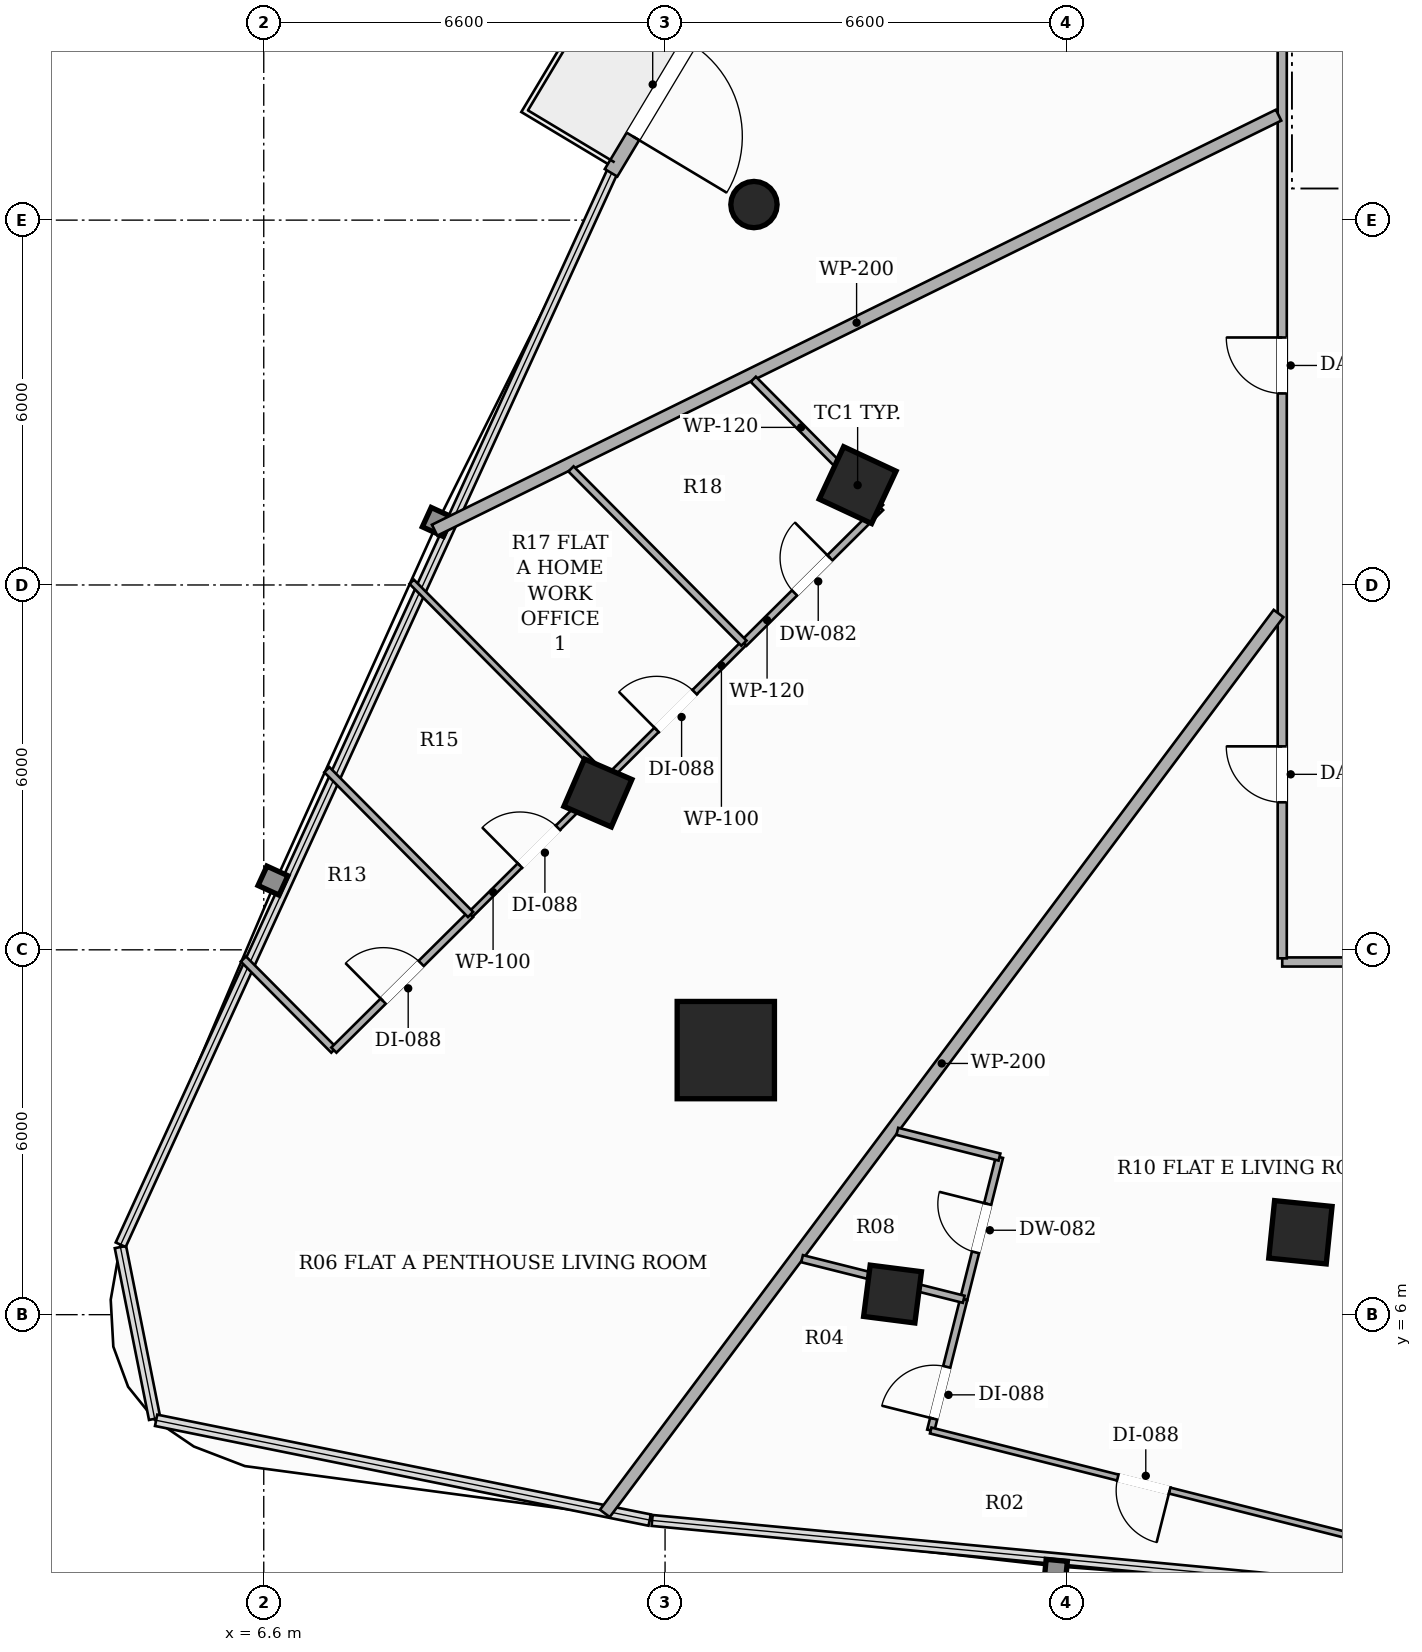
"""IFC4 building model, lengths in metres.
Left out: names, types, materials, properties, quantities, classifications, styles, units other than length and angle.
Written with IfcOpenShell. Run it as: python <this file> out.ifc"""

import sys

from ifc_helpers import new_model, si_unit, direction, frame, frame_2d, origin, origin_2d, place, context, subcontext, project, spatial, rectangle, hollow_rectangle, hollow_circle, extrude, element, fill, save


model = new_model("IFC4")
c1 = context("Model", 3, precision=1e-05, world=origin(), true_north=direction((0.0, 1.0)))
c2 = subcontext(c1, "Body", "Model", "MODEL_VIEW")
j1 = project(units=[si_unit("LENGTHUNIT", "METRE"), si_unit("PLANEANGLEUNIT", "RADIAN")], contexts=[c1])
p1 = place(None, origin())
s1 = spatial("IfcSite", under=j1, at=p1, CompositionType="ELEMENT")
p2 = place(p1, origin())
s2 = spatial("IfcBuilding", under=s1, at=p2, CompositionType="ELEMENT")
p3 = place(p2, frame((0.0, 0.0, 40.1)))
s3 = spatial("IfcBuildingStorey", under=s2, at=p3, CompositionType="ELEMENT", Elevation=40.1)
p4 = place(p3, frame((14.199, 10.351, 0.0), z_axis=(0.0, 0.0, 1.0), x_axis=(1.0, 0.0, 0.0)))
e1 = element("IfcColumn", 1, at=p4, inside=s3, PredefinedType="COLUMN", context=c2, shape_type="SweptSolid", body=[
    extrude(hollow_rectangle(XDim=1.6, YDim=1.6, WallThickness=0.05, at=origin_2d()), origin(), (0.0, 0.0, 1.0), 3.3),
])
for number, where, z_axis, x_axis in (
    (2, (16.367, 19.642, 0.0), (0.0, 0.0, 1.0), (0.423, 0.906, 0.0)),
    (3, (23.649, 7.355, 0.0), (0.0, 0.0, 1.0), (-0.995, 0.101, 0.0)),
):
    element("IfcColumn", number, at=place(p3, frame(where, z_axis=z_axis, x_axis=x_axis)), inside=s3, PredefinedType="COLUMN", context=c2, shape_type="SweptSolid", body=[
        extrude(hollow_rectangle(XDim=0.95, YDim=0.95, WallThickness=0.032, at=origin_2d()), origin(), (0.0, 0.0, 1.0), 3.3),
    ])
for number, where, z_axis, x_axis in (
    (4, (12.095, 14.58, 0.0), (0.0, 0.0, 1.0), (0.397, 0.918, 0.0)),
    (5, (16.941, 6.339, 0.0), (0.0, 0.0, 1.0), (-0.992, 0.127, 0.0)),
):
    element("IfcColumn", number, at=place(p3, frame(where, z_axis=z_axis, x_axis=x_axis)), inside=s3, PredefinedType="COLUMN", context=c2, shape_type="SweptSolid", body=[
        extrude(hollow_rectangle(XDim=0.85, YDim=0.85, WallThickness=0.028, at=origin_2d()), origin(), (0.0, 0.0, 1.0), 3.3),
    ])
p5 = place(p3, frame((14.662, 24.256, 0.0), z_axis=(0.0, 0.0, 1.0), x_axis=(1.0, 0.0, 0.0)))
e6 = element("IfcColumn", 6, at=p5, inside=s3, PredefinedType="COLUMN", context=c2, shape_type="SweptSolid", body=[
    extrude(hollow_circle(Radius=0.381, WallThickness=0.022, at=origin_2d()), origin(), (0.0, 0.0, 1.0), 3.3),
])
p6 = place(p3, frame((19.059, 36.028, 0.0), z_axis=(0.0, 0.0, 1.0), x_axis=(-0.514331531946, -0.857591438417, 0.0)))
e7 = element("IfcWall", 7, at=p6, inside=s3, PredefinedType="SOLIDWALL", context=c2, shape_type="SweptSolid", body=[
    extrude(rectangle(XDim=13.118, YDim=0.24, at=frame_2d((6.559, 0.0))), origin(), (0.0, 0.0, 1.0), 2.624),
])
p7 = place(p6, frame((10.62, 0.0, 0.0)))
e8 = element("IfcOpeningElement", 8, at=p7, cuts=e7, PredefinedType="OPENING", context=c2, shape_type="SweptSolid", body=[
    extrude(rectangle(XDim=1.8, YDim=2.2, at=frame_2d((0.9, 1.1))), frame((0.0, 0.13, 0.0), z_axis=(0.0, -1.0, 0.0), x_axis=(1.0, 0.0, 0.0)), (0.0, 0.0, 1.0), 0.26),
])
p8 = place(p3, frame((42.59, 11.8, 0.0), z_axis=(0.0, 0.0, 1.0), x_axis=(-1.0, 0.0, 0.0)))
e9 = element("IfcWall", 9, at=p8, inside=s3, PredefinedType="PARTITIONING", context=c2, shape_type="SweptSolid", body=[
    extrude(rectangle(XDim=19.24, YDim=0.15, at=frame_2d((9.62, 0.0))), origin(), (0.0, 0.0, 1.0), 2.669),
])
p9 = place(p8, frame((10.462, 0.0, 0.0)))
e10 = element("IfcOpeningElement", 10, at=p9, cuts=e9, PredefinedType="OPENING", context=c2, shape_type="SweptSolid", body=[
    extrude(rectangle(XDim=0.92, YDim=2.15, at=frame_2d((0.46, 1.075))), frame((0.0, 0.085, 0.0), z_axis=(0.0, -1.0, 0.0), x_axis=(1.0, 0.0, 0.0)), (0.0, 0.0, 1.0), 0.17),
])
p10 = place(p3, frame((23.35, 11.86, 0.0), z_axis=(0.0, 0.0, 1.0), x_axis=(0.0, 1.0, 0.0)))
e11 = element("IfcWall", 11, at=p10, inside=s3, PredefinedType="PARTITIONING", context=c2, shape_type="SweptSolid", body=[
    extrude(rectangle(XDim=25.04, YDim=0.15, at=frame_2d((12.52, 0.0))), origin(), (0.0, 0.0, 1.0), 2.413),
])
p11 = place(p10, frame((9.29, 0.0, 0.0)))
e12 = element("IfcOpeningElement", 12, at=p11, cuts=e11, PredefinedType="OPENING", context=c2, shape_type="SweptSolid", body=[
    extrude(rectangle(XDim=0.92, YDim=2.15, at=frame_2d((0.46, 1.075))), frame((0.0, 0.085, 0.0), z_axis=(0.0, -1.0, 0.0), x_axis=(1.0, 0.0, 0.0)), (0.0, 0.0, 1.0), 0.17),
])
p12 = place(p10, frame((18.865, 0.0, 0.0)))
e13 = element("IfcOpeningElement", 13, at=p12, cuts=e11, PredefinedType="OPENING", context=c2, shape_type="SweptSolid", body=[
    extrude(rectangle(XDim=0.88, YDim=2.1, at=frame_2d((0.44, 1.05))), frame((0.0, 0.085, 0.0), z_axis=(0.0, -1.0, 0.0), x_axis=(1.0, 0.0, 0.0)), (0.0, 0.0, 1.0), 0.17),
])
p13 = place(p10, frame((2.566, 0.0, 0.0)))
e14 = element("IfcOpeningElement", 14, at=p13, cuts=e11, PredefinedType="OPENING", context=c2, shape_type="SweptSolid", body=[
    extrude(rectangle(XDim=0.92, YDim=2.15, at=frame_2d((0.46, 1.075))), frame((0.0, 0.085, 0.0), z_axis=(0.0, -1.0, 0.0), x_axis=(1.0, 0.0, 0.0)), (0.0, 0.0, 1.0), 0.17),
])
p14 = place(p3, frame((9.41, 18.901, 0.0), z_axis=(0.0, 0.0, 1.0), x_axis=(0.89737804177, 0.44126256373, 0.0)))
e15 = element("IfcWall", 15, at=p14, inside=s3, PredefinedType="PARTITIONING", context=c2, shape_type="SweptSolid", body=[
    extrude(rectangle(XDim=15.468, YDim=0.2, at=frame_2d((7.734, 0.0))), origin(), (0.0, 0.0, 1.0), 2.413),
])
p15 = place(p3, frame((23.29, 17.531, 0.0), z_axis=(0.0, 0.0, 1.0), x_axis=(-0.599334217596, -0.800498904196, 0.0)))
e16 = element("IfcWall", 16, at=p15, inside=s3, PredefinedType="PARTITIONING", context=c2, shape_type="SweptSolid", body=[
    extrude(rectangle(XDim=18.487, YDim=0.2, at=frame_2d((9.244, 0.0))), origin(), (0.0, 0.0, 1.0), 2.413),
])
p16 = place(p3, frame((27.447, 11.74, 0.0), z_axis=(0.0, 0.0, 1.0), x_axis=(-0.283867721737, -0.958863450422, 0.0)))
e17 = element("IfcWall", 17, at=p16, inside=s3, PredefinedType="PARTITIONING", context=c2, shape_type="SweptSolid", body=[
    extrude(rectangle(XDim=10.664, YDim=0.2, at=frame_2d((5.332, 0.0))), origin(), (0.0, 0.0, 1.0), 2.413),
])
p17 = place(p3, frame((14.497, 17.043, 0.0), z_axis=(0.0, 0.0, 1.0), x_axis=(0.709608291954, 0.704596389425, 0.0)))
e18 = element("IfcWall", 18, at=p17, inside=s3, PredefinedType="PARTITIONING", context=c2, shape_type="SweptSolid", body=[
    extrude(rectangle(XDim=3.166, YDim=0.12, at=frame_2d((1.583, 0.0))), origin(), (0.0, 0.0, 1.0), 2.413),
])
p18 = place(p17, frame((1.173, 0.0, 0.0)))
e19 = element("IfcOpeningElement", 19, at=p18, cuts=e18, PredefinedType="OPENING", context=c2, shape_type="SweptSolid", body=[
    extrude(rectangle(XDim=0.82, YDim=2.1, at=frame_2d((0.41, 1.05))), frame((0.0, 0.07, 0.0), z_axis=(0.0, -1.0, 0.0), x_axis=(1.0, 0.0, 0.0)), (0.0, 0.0, 1.0), 0.14),
])
p19 = place(p3, frame((16.744, 19.274, 0.0), z_axis=(0.0, 0.0, 1.0), x_axis=(-0.704390177625, 0.709812987811, 0.0)))
e20 = element("IfcWall", 20, at=p19, inside=s3, PredefinedType="PARTITIONING", context=c2, shape_type="SweptSolid", body=[
    extrude(rectangle(XDim=2.971, YDim=0.12, at=frame_2d((1.486, 0.0))), origin(), (0.0, 0.0, 1.0), 2.413),
])
p20 = place(p3, frame((6.265, 11.849, 0.0), z_axis=(0.0, 0.0, 1.0), x_axis=(0.7047325022, -0.709473114602, 0.0)))
e21 = element("IfcWall", 21, at=p20, inside=s3, PredefinedType="PARTITIONING", context=c2, shape_type="SweptSolid", body=[
    extrude(rectangle(XDim=2.112, YDim=0.12, at=frame_2d((1.056, 0.0))), origin(), (0.0, 0.0, 1.0), 2.619),
])
p21 = place(p3, frame((7.753, 10.351, 0.0), z_axis=(0.0, 0.0, 1.0), x_axis=(0.709953794815, 0.704248258236, 0.0)))
e22 = element("IfcWall", 22, at=p21, inside=s3, PredefinedType="PARTITIONING", context=c2, shape_type="SweptSolid", body=[
    extrude(rectangle(XDim=3.167, YDim=0.12, at=frame_2d((1.583, 0.0))), origin(), (0.0, 0.0, 1.0), 2.619),
])
p22 = place(p21, frame((1.143, 0.0, 0.0)))
e23 = element("IfcOpeningElement", 23, at=p22, cuts=e22, PredefinedType="OPENING", context=c2, shape_type="SweptSolid", body=[
    extrude(rectangle(XDim=0.88, YDim=2.1, at=frame_2d((0.44, 1.05))), frame((0.0, 0.07, 0.0), z_axis=(0.0, -1.0, 0.0), x_axis=(1.0, 0.0, 0.0)), (0.0, 0.0, 1.0), 0.14),
])
p23 = place(p3, frame((10.001, 12.581, 0.0), z_axis=(0.0, 0.0, 1.0), x_axis=(0.70979961262, 0.70440365553, 0.0)))
e24 = element("IfcWall", 24, at=p23, inside=s3, PredefinedType="PARTITIONING", context=c2, shape_type="SweptSolid", body=[
    extrude(rectangle(XDim=3.167, YDim=0.1, at=frame_2d((1.583, 0.0))), origin(), (0.0, 0.0, 1.0), 2.413),
])
p24 = place(p23, frame((1.144, 0.0, 0.0)))
e25 = element("IfcOpeningElement", 25, at=p24, cuts=e24, PredefinedType="OPENING", context=c2, shape_type="SweptSolid", body=[
    extrude(rectangle(XDim=0.88, YDim=2.1, at=frame_2d((0.44, 1.05))), frame((0.0, 0.06, 0.0), z_axis=(0.0, -1.0, 0.0), x_axis=(1.0, 0.0, 0.0)), (0.0, 0.0, 1.0), 0.12),
])
p25 = place(p3, frame((12.249, 14.812, 0.0), z_axis=(0.0, 0.0, 1.0), x_axis=(0.70979961262, 0.70440365553, 0.0)))
e26 = element("IfcWall", 26, at=p25, inside=s3, PredefinedType="PARTITIONING", context=c2, shape_type="SweptSolid", body=[
    extrude(rectangle(XDim=3.167, YDim=0.1, at=frame_2d((1.583, 0.0))), origin(), (0.0, 0.0, 1.0), 2.413),
])
p26 = place(p25, frame((1.144, 0.0, 0.0)))
e27 = element("IfcOpeningElement", 27, at=p26, cuts=e26, PredefinedType="OPENING", context=c2, shape_type="SweptSolid", body=[
    extrude(rectangle(XDim=0.88, YDim=2.1, at=frame_2d((0.44, 1.05))), frame((0.0, 0.06, 0.0), z_axis=(0.0, -1.0, 0.0), x_axis=(1.0, 0.0, 0.0)), (0.0, 0.0, 1.0), 0.12),
])
p27 = place(p3, frame((14.497, 17.043, 0.0), z_axis=(0.0, 0.0, 1.0), x_axis=(-0.704380529073, 0.70982256252, 0.0)))
e28 = element("IfcWall", 28, at=p27, inside=s3, PredefinedType="PARTITIONING", context=c2, shape_type="SweptSolid", body=[
    extrude(rectangle(XDim=4.038, YDim=0.12, at=frame_2d((2.019, 0.0))), origin(), (0.0, 0.0, 1.0), 2.413),
])
p28 = place(p3, frame((7.638, 14.962, 0.0), z_axis=(0.0, 0.0, 1.0), x_axis=(0.704445292194, -0.709758290058, 0.0)))
e29 = element("IfcWall", 29, at=p28, inside=s3, PredefinedType="PARTITIONING", context=c2, shape_type="SweptSolid", body=[
    extrude(rectangle(XDim=3.354, YDim=0.12, at=frame_2d((1.677, 0.0))), origin(), (0.0, 0.0, 1.0), 3.06),
])
p29 = place(p3, frame((9.033, 18.053, 0.0), z_axis=(0.0, 0.0, 1.0), x_axis=(0.704374497722, -0.709828547579, 0.0)))
e30 = element("IfcWall", 30, at=p29, inside=s3, PredefinedType="PARTITIONING", context=c2, shape_type="SweptSolid", body=[
    extrude(rectangle(XDim=4.566, YDim=0.1, at=frame_2d((2.283, 0.0))), origin(), (0.0, 0.0, 1.0), 2.413),
])
p30 = place(p3, frame((18.112, 6.253, 0.0), z_axis=(0.0, 0.0, 1.0), x_axis=(0.2437501366, 0.96983806427, 0.0)))
e31 = element("IfcWall", 31, at=p30, inside=s3, PredefinedType="PARTITIONING", context=c2, shape_type="SweptSolid", body=[
    extrude(rectangle(XDim=2.412, YDim=0.12, at=frame_2d((1.206, 0.0))), origin(), (0.0, 0.0, 1.0), 2.413),
])
p31 = place(p30, frame((0.796, 0.0, 0.0)))
e32 = element("IfcOpeningElement", 32, at=p31, cuts=e31, PredefinedType="OPENING", context=c2, shape_type="SweptSolid", body=[
    extrude(rectangle(XDim=0.82, YDim=2.1, at=frame_2d((0.41, 1.05))), frame((0.0, 0.07, 0.0), z_axis=(0.0, -1.0, 0.0), x_axis=(1.0, 0.0, 0.0)), (0.0, 0.0, 1.0), 0.14),
])
p32 = place(p3, frame((18.7, 8.592, 0.0), z_axis=(0.0, 0.0, 1.0), x_axis=(-0.969751613308, 0.244093851802, 0.0)))
e33 = element("IfcWall", 33, at=p32, inside=s3, PredefinedType="PARTITIONING", context=c2, shape_type="SweptSolid", body=[
    extrude(rectangle(XDim=1.732, YDim=0.12, at=frame_2d((0.866, 0.0))), origin(), (0.0, 0.0, 1.0), 2.669),
])
p33 = place(p3, frame((17.569, 4.095, 0.0), z_axis=(0.0, 0.0, 1.0), x_axis=(0.244006821807, 0.969773515266, 0.0)))
e34 = element("IfcWall", 34, at=p33, inside=s3, PredefinedType="PARTITIONING", context=c2, shape_type="SweptSolid", body=[
    extrude(rectangle(XDim=2.225, YDim=0.12, at=frame_2d((1.113, 0.0))), origin(), (0.0, 0.0, 1.0), 2.413),
])
p34 = place(p33, frame((0.2, 0.0, 0.0)))
e35 = element("IfcOpeningElement", 35, at=p34, cuts=e34, PredefinedType="OPENING", context=c2, shape_type="SweptSolid", body=[
    extrude(rectangle(XDim=0.88, YDim=2.1, at=frame_2d((0.44, 1.05))), frame((0.0, 0.07, 0.0), z_axis=(0.0, -1.0, 0.0), x_axis=(1.0, 0.0, 0.0)), (0.0, 0.0, 1.0), 0.14),
])
p35 = place(p3, frame((24.574, 2.334, 0.0), z_axis=(0.0, 0.0, 1.0), x_axis=(-0.9698235368, 0.243807931512, 0.0)))
e36 = element("IfcWall", 36, at=p35, inside=s3, PredefinedType="PARTITIONING", context=c2, shape_type="SweptSolid", body=[
    extrude(rectangle(XDim=7.223, YDim=0.1, at=frame_2d((3.611, 0.0))), origin(), (0.0, 0.0, 1.0), 3.06),
])
p36 = place(p35, frame((3.171, 0.0, 0.0)))
e37 = element("IfcOpeningElement", 37, at=p36, cuts=e36, PredefinedType="OPENING", context=c2, shape_type="SweptSolid", body=[
    extrude(rectangle(XDim=0.88, YDim=2.1, at=frame_2d((0.44, 1.05))), frame((0.0, 0.06, 0.0), z_axis=(0.0, -1.0, 0.0), x_axis=(1.0, 0.0, 0.0)), (0.0, 0.0, 1.0), 0.12),
])
p37 = place(p3, frame((18.112, 6.253, 0.0), z_axis=(0.0, 0.0, 1.0), x_axis=(-0.969869517874, 0.243624954178, 0.0)))
e38 = element("IfcWall", 38, at=p37, inside=s3, PredefinedType="PARTITIONING", context=c2, shape_type="SweptSolid", body=[
    extrude(rectangle(XDim=2.742, YDim=0.12, at=frame_2d((1.371, 0.0))), origin(), (0.0, 0.0, 1.0), 2.413),
])
p38 = place(p7, origin())
e39 = element("IfcDoor", 39, at=p38, inside=s3, OperationType="SINGLE_SWING_RIGHT", PredefinedType="DOOR", context=c2, shape_type="SweptSolid", body=[
    extrude(rectangle(XDim=1.8, YDim=2.2, at=frame_2d((0.9, 1.1))), frame((0.0, 0.025, 0.0), z_axis=(0.0, -1.0, 0.0), x_axis=(1.0, 0.0, 0.0)), (0.0, 0.0, 1.0), 0.05),
])
fill(e8, e39)
p39 = place(p11, origin())
e40 = element("IfcDoor", 40, at=p39, inside=s3, OperationType="SINGLE_SWING_RIGHT", PredefinedType="DOOR", context=c2, shape_type="SweptSolid", body=[
    extrude(rectangle(XDim=0.92, YDim=2.15, at=frame_2d((0.46, 1.075))), frame((0.0, 0.025, 0.0), z_axis=(0.0, -1.0, 0.0), x_axis=(1.0, 0.0, 0.0)), (0.0, 0.0, 1.0), 0.05),
])
fill(e12, e40)
p40 = place(p18, origin())
e41 = element("IfcDoor", 41, at=p40, inside=s3, OperationType="SINGLE_SWING_RIGHT", PredefinedType="DOOR", context=c2, shape_type="SweptSolid", body=[
    extrude(rectangle(XDim=0.82, YDim=2.1, at=frame_2d((0.41, 1.05))), frame((0.0, 0.025, 0.0), z_axis=(0.0, -1.0, 0.0), x_axis=(1.0, 0.0, 0.0)), (0.0, 0.0, 1.0), 0.05),
])
fill(e19, e41)
p41 = place(p22, origin())
e42 = element("IfcDoor", 42, at=p41, inside=s3, OperationType="SINGLE_SWING_LEFT", PredefinedType="DOOR", context=c2, shape_type="SweptSolid", body=[
    extrude(rectangle(XDim=0.88, YDim=2.1, at=frame_2d((0.44, 1.05))), frame((0.0, 0.025, 0.0), z_axis=(0.0, -1.0, 0.0), x_axis=(1.0, 0.0, 0.0)), (0.0, 0.0, 1.0), 0.05),
])
fill(e23, e42)
p42 = place(p24, origin())
e43 = element("IfcDoor", 43, at=p42, inside=s3, OperationType="SINGLE_SWING_LEFT", PredefinedType="DOOR", context=c2, shape_type="SweptSolid", body=[
    extrude(rectangle(XDim=0.88, YDim=2.1, at=frame_2d((0.44, 1.05))), frame((0.0, 0.025, 0.0), z_axis=(0.0, -1.0, 0.0), x_axis=(1.0, 0.0, 0.0)), (0.0, 0.0, 1.0), 0.05),
])
fill(e25, e43)
p43 = place(p26, origin())
e44 = element("IfcDoor", 44, at=p43, inside=s3, OperationType="SINGLE_SWING_LEFT", PredefinedType="DOOR", context=c2, shape_type="SweptSolid", body=[
    extrude(rectangle(XDim=0.88, YDim=2.1, at=frame_2d((0.44, 1.05))), frame((0.0, 0.025, 0.0), z_axis=(0.0, -1.0, 0.0), x_axis=(1.0, 0.0, 0.0)), (0.0, 0.0, 1.0), 0.05),
])
fill(e27, e44)
p44 = place(p13, origin())
e45 = element("IfcDoor", 45, at=p44, inside=s3, OperationType="SINGLE_SWING_RIGHT", PredefinedType="DOOR", context=c2, shape_type="SweptSolid", body=[
    extrude(rectangle(XDim=0.92, YDim=2.15, at=frame_2d((0.46, 1.075))), frame((0.0, 0.025, 0.0), z_axis=(0.0, -1.0, 0.0), x_axis=(1.0, 0.0, 0.0)), (0.0, 0.0, 1.0), 0.05),
])
fill(e14, e45)
p45 = place(p31, origin())
e46 = element("IfcDoor", 46, at=p45, inside=s3, OperationType="SINGLE_SWING_RIGHT", PredefinedType="DOOR", context=c2, shape_type="SweptSolid", body=[
    extrude(rectangle(XDim=0.82, YDim=2.1, at=frame_2d((0.41, 1.05))), frame((0.0, 0.025, 0.0), z_axis=(0.0, -1.0, 0.0), x_axis=(1.0, 0.0, 0.0)), (0.0, 0.0, 1.0), 0.05),
])
fill(e32, e46)
p46 = place(p34, origin())
e47 = element("IfcDoor", 47, at=p46, inside=s3, OperationType="SINGLE_SWING_LEFT", PredefinedType="DOOR", context=c2, shape_type="SweptSolid", body=[
    extrude(rectangle(XDim=0.88, YDim=2.1, at=frame_2d((0.44, 1.05))), frame((0.0, 0.025, 0.0), z_axis=(0.0, -1.0, 0.0), x_axis=(1.0, 0.0, 0.0)), (0.0, 0.0, 1.0), 0.05),
])
fill(e35, e47)
p47 = place(p36, origin())
e48 = element("IfcDoor", 48, at=p47, inside=s3, OperationType="SINGLE_SWING_LEFT", PredefinedType="DOOR", context=c2, shape_type="SweptSolid", body=[
    extrude(rectangle(XDim=0.88, YDim=2.1, at=frame_2d((0.44, 1.05))), frame((0.0, 0.025, 0.0), z_axis=(0.0, -1.0, 0.0), x_axis=(1.0, 0.0, 0.0)), (0.0, 0.0, 1.0), 0.05),
])
fill(e37, e48)
save(model, sys.argv[1])
